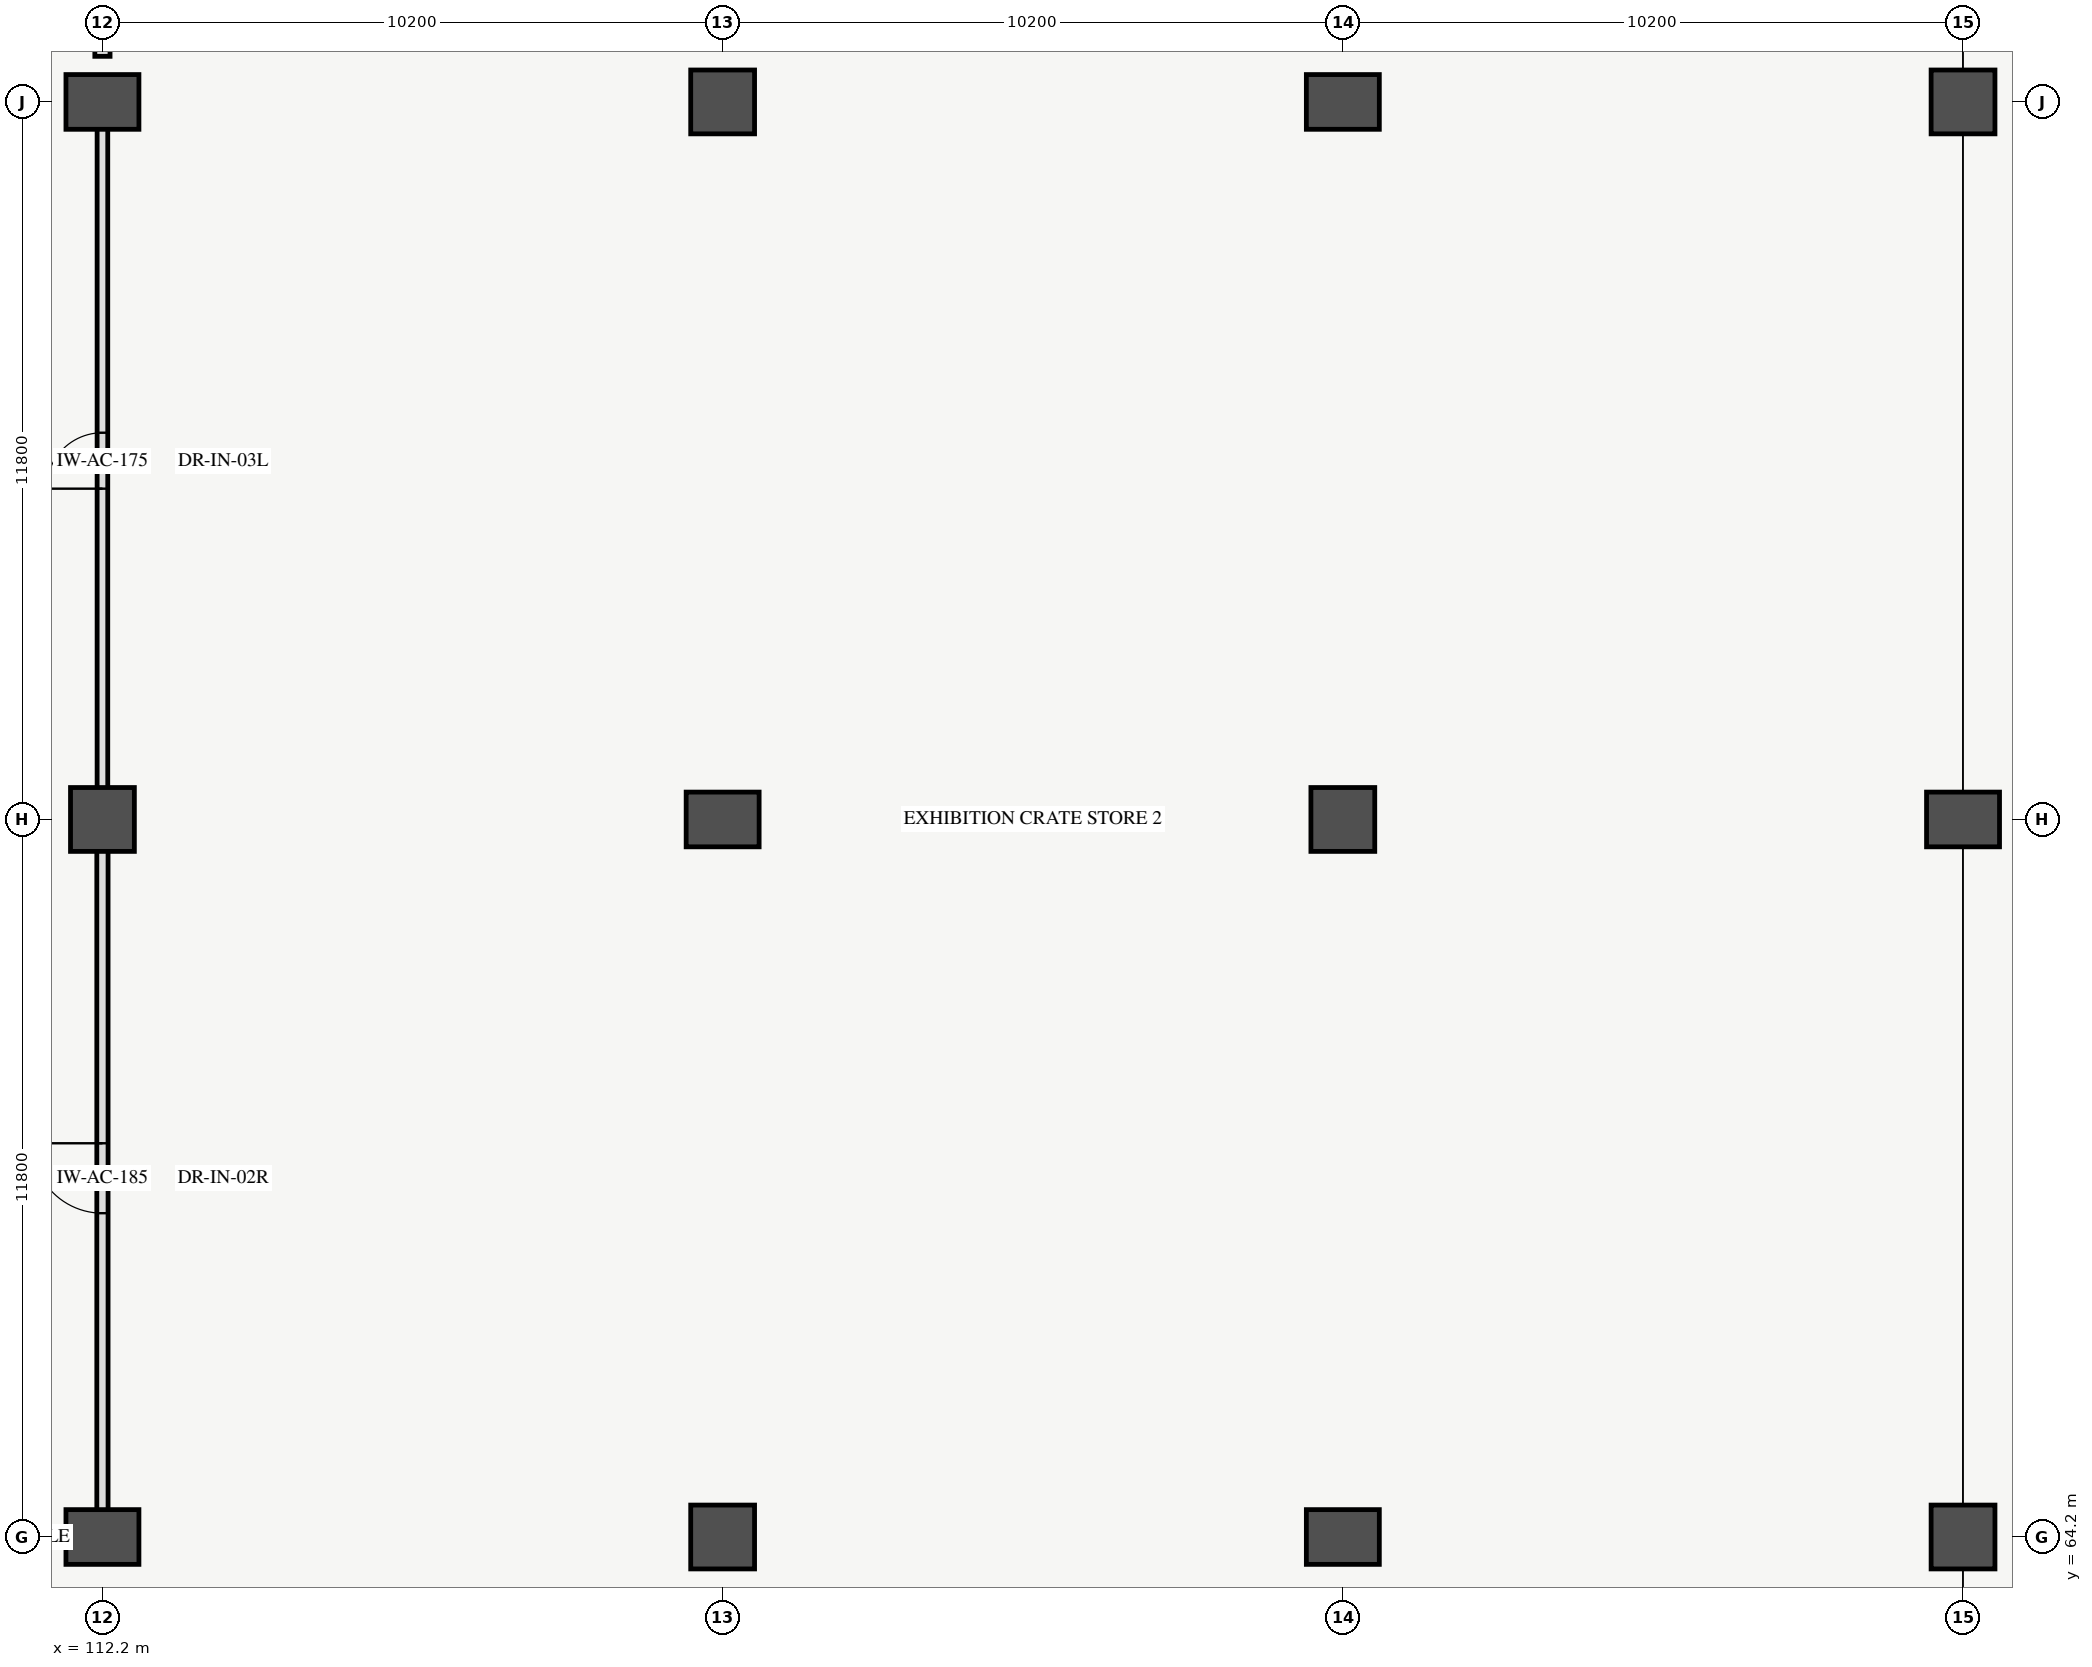
"""IFC4 building model, lengths in metres.
Left out: names, types, materials, properties, quantities, classifications, styles, units other than length and angle.
Written with IfcOpenShell. Run it as: python <this file> out.ifc"""

import sys

from ifc_helpers import new_model, si_unit, direction, frame, frame_2d, origin, origin_2d, place, context, subcontext, project, spatial, rectangle, extrude, element, fill, save


model = new_model("IFC4")
c1 = context("Model", 3, precision=1e-05, world=origin(), true_north=direction((0.0, 1.0)))
c2 = subcontext(c1, "Body", "Model", "MODEL_VIEW")
j1 = project(units=[si_unit("LENGTHUNIT", "METRE"), si_unit("PLANEANGLEUNIT", "RADIAN")], contexts=[c1])
p1 = place(None, origin())
s1 = spatial("IfcSite", under=j1, at=p1, CompositionType="ELEMENT")
p2 = place(p1, origin())
s2 = spatial("IfcBuilding", under=s1, at=p2, CompositionType="ELEMENT")
p3 = place(p2, frame((0.0, 0.0, -4.5)))
s3 = spatial("IfcBuildingStorey", under=s2, at=p3, CompositionType="ELEMENT", Elevation=-4.5)
p4 = place(p3, frame((112.2, 64.2, 0.0), z_axis=(0.0, 0.0, 1.0), x_axis=(1.0, 0.0, 0.0)))
e1 = element("IfcColumn", 1, at=p4, inside=s3, PredefinedType="COLUMN", context=c2, shape_type="SweptSolid", body=[
    extrude(rectangle(XDim=1.2, YDim=0.9, at=origin_2d()), origin(), (0.0, 0.0, 1.0), 4.12),
])
p5 = place(p3, frame((112.2, 76.0, 0.0), z_axis=(0.0, 0.0, 1.0), x_axis=(1.0, 0.0, 0.0)))
e2 = element("IfcColumn", 2, at=p5, inside=s3, PredefinedType="COLUMN", context=c2, shape_type="SweptSolid", body=[
    extrude(rectangle(XDim=1.05, YDim=1.05, at=origin_2d()), origin(), (0.0, 0.0, 1.0), 4.12),
])
p6 = place(p3, frame((112.2, 87.8, 0.0), z_axis=(0.0, 0.0, 1.0), x_axis=(1.0, 0.0, 0.0)))
e3 = element("IfcColumn", 3, at=p6, inside=s3, PredefinedType="COLUMN", context=c2, shape_type="SweptSolid", body=[
    extrude(rectangle(XDim=1.2, YDim=0.9, at=origin_2d()), origin(), (0.0, 0.0, 1.0), 4.12),
])
p7 = place(p3, frame((122.4, 64.2, 0.0), z_axis=(0.0, 0.0, 1.0), x_axis=(1.0, 0.0, 0.0)))
e4 = element("IfcColumn", 4, at=p7, inside=s3, PredefinedType="COLUMN", context=c2, shape_type="SweptSolid", body=[
    extrude(rectangle(XDim=1.05, YDim=1.05, at=origin_2d()), origin(), (0.0, 0.0, 1.0), 4.12),
])
p8 = place(p3, frame((122.4, 76.0, 0.0), z_axis=(0.0, 0.0, 1.0), x_axis=(1.0, 0.0, 0.0)))
e5 = element("IfcColumn", 5, at=p8, inside=s3, PredefinedType="COLUMN", context=c2, shape_type="SweptSolid", body=[
    extrude(rectangle(XDim=1.2, YDim=0.9, at=origin_2d()), origin(), (0.0, 0.0, 1.0), 4.12),
])
p9 = place(p3, frame((122.4, 87.8, 0.0), z_axis=(0.0, 0.0, 1.0), x_axis=(1.0, 0.0, 0.0)))
e6 = element("IfcColumn", 6, at=p9, inside=s3, PredefinedType="COLUMN", context=c2, shape_type="SweptSolid", body=[
    extrude(rectangle(XDim=1.05, YDim=1.05, at=origin_2d()), origin(), (0.0, 0.0, 1.0), 4.12),
])
p10 = place(p3, frame((132.6, 64.2, 0.0), z_axis=(0.0, 0.0, 1.0), x_axis=(1.0, 0.0, 0.0)))
e7 = element("IfcColumn", 7, at=p10, inside=s3, PredefinedType="COLUMN", context=c2, shape_type="SweptSolid", body=[
    extrude(rectangle(XDim=1.2, YDim=0.9, at=origin_2d()), origin(), (0.0, 0.0, 1.0), 4.12),
])
p11 = place(p3, frame((132.6, 76.0, 0.0), z_axis=(0.0, 0.0, 1.0), x_axis=(1.0, 0.0, 0.0)))
e8 = element("IfcColumn", 8, at=p11, inside=s3, PredefinedType="COLUMN", context=c2, shape_type="SweptSolid", body=[
    extrude(rectangle(XDim=1.05, YDim=1.05, at=origin_2d()), origin(), (0.0, 0.0, 1.0), 4.12),
])
p12 = place(p3, frame((132.6, 87.8, 0.0), z_axis=(0.0, 0.0, 1.0), x_axis=(1.0, 0.0, 0.0)))
e9 = element("IfcColumn", 9, at=p12, inside=s3, PredefinedType="COLUMN", context=c2, shape_type="SweptSolid", body=[
    extrude(rectangle(XDim=1.2, YDim=0.9, at=origin_2d()), origin(), (0.0, 0.0, 1.0), 4.12),
])
p13 = place(p3, frame((142.8, 64.2, 0.0), z_axis=(0.0, 0.0, 1.0), x_axis=(1.0, 0.0, 0.0)))
e10 = element("IfcColumn", 10, at=p13, inside=s3, PredefinedType="COLUMN", context=c2, shape_type="SweptSolid", body=[
    extrude(rectangle(XDim=1.05, YDim=1.05, at=origin_2d()), origin(), (0.0, 0.0, 1.0), 4.5),
])
p14 = place(p3, frame((142.8, 76.0, 0.0), z_axis=(0.0, 0.0, 1.0), x_axis=(1.0, 0.0, 0.0)))
e11 = element("IfcColumn", 11, at=p14, inside=s3, PredefinedType="COLUMN", context=c2, shape_type="SweptSolid", body=[
    extrude(rectangle(XDim=1.2, YDim=0.9, at=origin_2d()), origin(), (0.0, 0.0, 1.0), 4.5),
])
p15 = place(p3, frame((142.8, 87.8, 0.0), z_axis=(0.0, 0.0, 1.0), x_axis=(1.0, 0.0, 0.0)))
e12 = element("IfcColumn", 12, at=p15, inside=s3, PredefinedType="COLUMN", context=c2, shape_type="SweptSolid", body=[
    extrude(rectangle(XDim=1.05, YDim=1.05, at=origin_2d()), origin(), (0.0, 0.0, 1.0), 4.5),
])
p16 = place(p3, frame((112.2, 88.55, 0.0), z_axis=(0.0, 0.0, 1.0), x_axis=(0.0, 1.0, 0.0)))
e13 = element("IfcWall", 13, at=p16, inside=s3, PredefinedType="SOLIDWALL", context=c2, shape_type="SweptSolid", body=[
    extrude(rectangle(XDim=10.3, YDim=0.25, at=frame_2d((5.15, 0.0))), origin(), (0.0, 0.0, 1.0), 3.08),
])
p17 = place(p16, frame((3.05, 0.0, 0.0)))
e14 = element("IfcOpeningElement", 14, at=p17, cuts=e13, PredefinedType="OPENING", context=c2, shape_type="SweptSolid", body=[
    extrude(rectangle(XDim=4.2, YDim=2.75, at=frame_2d((2.1, 1.375))), frame((0.0, 0.135, 0.0), z_axis=(0.0, -1.0, 0.0), x_axis=(1.0, 0.0, 0.0)), (0.0, 0.0, 1.0), 0.27),
])
p18 = place(p3, frame((112.2, 64.6, 0.0), z_axis=(0.0, 0.0, 1.0), x_axis=(0.0, 1.0, 0.0)))
e15 = element("IfcWall", 15, at=p18, inside=s3, PredefinedType="PARTITIONING", context=c2, shape_type="SweptSolid", body=[
    extrude(rectangle(XDim=11.0, YDim=0.185, at=frame_2d((5.5, 0.0))), origin(), (0.0, 0.0, 1.0), 2.75),
])
p19 = place(p18, frame((4.925, 0.0, 0.0)))
e16 = element("IfcOpeningElement", 16, at=p19, cuts=e15, PredefinedType="OPENING", context=c2, shape_type="SweptSolid", body=[
    extrude(rectangle(XDim=1.15, YDim=2.2, at=frame_2d((0.575, 1.1))), frame((0.0, 0.103, 0.0), z_axis=(0.0, -1.0, 0.0), x_axis=(1.0, 0.0, 0.0)), (0.0, 0.0, 1.0), 0.205),
])
p20 = place(p3, frame((112.2, 76.4, 0.0), z_axis=(0.0, 0.0, 1.0), x_axis=(0.0, 1.0, 0.0)))
e17 = element("IfcWall", 17, at=p20, inside=s3, PredefinedType="PARTITIONING", context=c2, shape_type="SweptSolid", body=[
    extrude(rectangle(XDim=11.0, YDim=0.175, at=frame_2d((5.5, 0.0))), origin(), (0.0, 0.0, 1.0), 2.75),
])
p21 = place(p20, frame((5.04, 0.0, 0.0)))
e18 = element("IfcOpeningElement", 18, at=p21, cuts=e17, PredefinedType="OPENING", context=c2, shape_type="SweptSolid", body=[
    extrude(rectangle(XDim=0.92, YDim=2.1, at=frame_2d((0.46, 1.05))), frame((0.0, 0.097, 0.0), z_axis=(0.0, -1.0, 0.0), x_axis=(1.0, 0.0, 0.0)), (0.0, 0.0, 1.0), 0.195),
])
p22 = place(p19, origin())
e19 = element("IfcDoor", 19, at=p22, inside=s3, OperationType="SINGLE_SWING_RIGHT", PredefinedType="DOOR", context=c2, shape_type="SweptSolid", body=[
    extrude(rectangle(XDim=1.15, YDim=2.2, at=frame_2d((0.575, 1.1))), frame((0.0, 0.025, 0.0), z_axis=(0.0, -1.0, 0.0), x_axis=(1.0, 0.0, 0.0)), (0.0, 0.0, 1.0), 0.05),
])
fill(e16, e19)
p23 = place(p21, origin())
e20 = element("IfcDoor", 20, at=p23, inside=s3, OperationType="SINGLE_SWING_LEFT", PredefinedType="DOOR", context=c2, shape_type="SweptSolid", body=[
    extrude(rectangle(XDim=0.92, YDim=2.1, at=frame_2d((0.46, 1.05))), frame((0.0, 0.025, 0.0), z_axis=(0.0, -1.0, 0.0), x_axis=(1.0, 0.0, 0.0)), (0.0, 0.0, 1.0), 0.05),
])
fill(e18, e20)
save(model, sys.argv[1])
